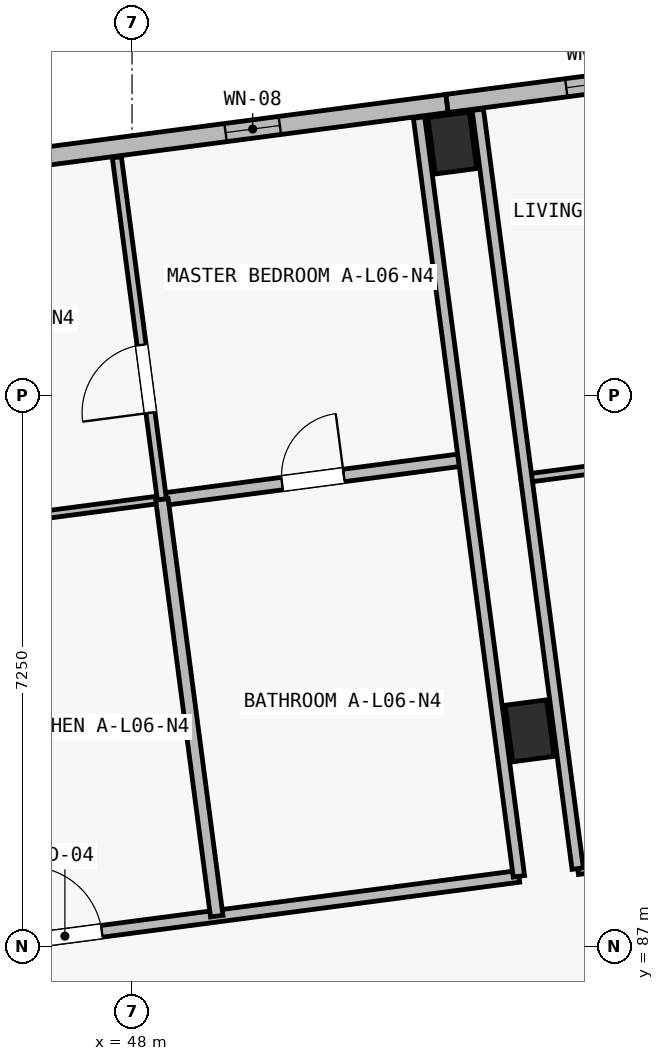
"""IFC4 building model, lengths in metres.
Left out: names, types, materials, properties, quantities, classifications, styles, units other than length and angle.
Written with IfcOpenShell. Run it as: python <this file> out.ifc"""

import sys

from ifc_helpers import new_model, si_unit, direction, frame, frame_2d, origin, origin_2d, place, context, subcontext, project, spatial, rectangle, extrude, element, fill, save


model = new_model("IFC4")
c1 = context("Model", 3, precision=1e-05, world=origin(), true_north=direction((0.0, 1.0)))
c2 = subcontext(c1, "Body", "Model", "MODEL_VIEW")
j1 = project(units=[si_unit("LENGTHUNIT", "METRE"), si_unit("PLANEANGLEUNIT", "RADIAN")], contexts=[c1])
p1 = place(None, origin())
s1 = spatial("IfcSite", under=j1, at=p1, CompositionType="ELEMENT")
p2 = place(p1, origin())
s2 = spatial("IfcBuilding", under=s1, at=p2, CompositionType="ELEMENT")
p3 = place(p2, frame((0.0, 0.0, 21.4)))
s3 = spatial("IfcBuildingStorey", under=s2, at=p3, CompositionType="ELEMENT", Elevation=21.4)
for number, where, z_axis, x_axis in (
    (1, (53.231, 89.839, 0.0), (0.0, 0.0, 1.0), (0.991, 0.131, 0.0)),
    (2, (52.213, 97.572, 0.0), (0.0, 0.0, 1.0), (0.991, 0.131, 0.0)),
):
    element("IfcColumn", number, at=place(p3, frame(where, z_axis=z_axis, x_axis=x_axis)), inside=s3, PredefinedType="COLUMN", context=c2, shape_type="SweptSolid", body=[
        extrude(rectangle(XDim=0.55, YDim=0.75, at=origin_2d()), origin(), (0.0, 0.0, 1.0), 3.25),
    ])
p4 = place(p3, frame((43.42, 96.944, 0.0), z_axis=(0.0, 0.0, 1.0), x_axis=(0.991443905089, 0.130533455715, 0.0)))
e3 = element("IfcWall", 3, at=p4, inside=s3, PredefinedType="SOLIDWALL", context=c2, shape_type="SweptSolid", body=[
    extrude(rectangle(XDim=8.8, YDim=0.24, at=frame_2d((4.4, 0.0))), origin(), (0.0, 0.0, 1.0), 3.0),
])
p5 = place(p4, frame((2.241, 0.0, 0.44)))
e4 = element("IfcOpeningElement", 4, at=p5, cuts=e3, PredefinedType="OPENING", context=c2, shape_type="SweptSolid", body=[
    extrude(rectangle(XDim=0.64, YDim=2.18, at=frame_2d((0.32, 1.09))), frame((0.0, 0.135, 0.0), z_axis=(0.0, -1.0, 0.0), x_axis=(1.0, 0.0, 0.0)), (0.0, 0.0, 1.0), 0.27),
])
p6 = place(p4, frame((5.861, 0.0, 0.5)))
e5 = element("IfcOpeningElement", 5, at=p6, cuts=e3, PredefinedType="OPENING", context=c2, shape_type="SweptSolid", body=[
    extrude(rectangle(XDim=0.72, YDim=2.16, at=frame_2d((0.36, 1.08))), frame((0.0, 0.135, 0.0), z_axis=(0.0, -1.0, 0.0), x_axis=(1.0, 0.0, 0.0)), (0.0, 0.0, 1.0), 0.27),
])
p7 = place(p3, frame((52.145, 98.093, 0.0), z_axis=(0.0, 0.0, 1.0), x_axis=(0.991442885224, 0.130541201693, 0.0)))
e6 = element("IfcWall", 6, at=p7, inside=s3, PredefinedType="SOLIDWALL", context=c2, shape_type="SweptSolid", body=[
    extrude(rectangle(XDim=9.325, YDim=0.24, at=frame_2d((4.663, 0.0))), origin(), (0.0, 0.0, 1.0), 3.0),
])
p8 = place(p7, frame((1.582, 0.0, 0.5)))
e7 = element("IfcOpeningElement", 7, at=p8, cuts=e6, PredefinedType="OPENING", context=c2, shape_type="SweptSolid", body=[
    extrude(rectangle(XDim=0.78, YDim=2.2, at=frame_2d((0.39, 1.1))), frame((0.0, 0.135, 0.0), z_axis=(0.0, -1.0, 0.0), x_axis=(1.0, 0.0, 0.0)), (0.0, 0.0, 1.0), 0.27),
])
p9 = place(p7, frame((6.926, 0.0, 0.44)))
e8 = element("IfcOpeningElement", 8, at=p9, cuts=e6, PredefinedType="OPENING", context=c2, shape_type="SweptSolid", body=[
    extrude(rectangle(XDim=0.86, YDim=2.36, at=frame_2d((0.43, 1.18))), frame((0.0, 0.135, 0.0), z_axis=(0.0, -1.0, 0.0), x_axis=(1.0, 0.0, 0.0)), (0.0, 0.0, 1.0), 0.27),
])
p10 = place(p3, frame((45.138, 86.877, 0.0), z_axis=(0.0, 0.0, 1.0), x_axis=(0.991444034844, 0.130532470184, 0.0)))
e9 = element("IfcWall", 9, at=p10, inside=s3, PredefinedType="PARTITIONING", context=c2, shape_type="SweptSolid", body=[
    extrude(rectangle(XDim=8.02, YDim=0.155, at=frame_2d((4.01, 0.0))), origin(), (0.0, 0.0, 1.0), 2.97),
])
p11 = place(p10, frame((1.505, 0.0, 0.0)))
e10 = element("IfcOpeningElement", 10, at=p11, cuts=e9, PredefinedType="OPENING", context=c2, shape_type="SweptSolid", body=[
    extrude(rectangle(XDim=0.98, YDim=2.15, at=frame_2d((0.49, 1.075))), frame((0.0, 0.093, 0.0), z_axis=(0.0, -1.0, 0.0), x_axis=(1.0, 0.0, 0.0)), (0.0, 0.0, 1.0), 0.185),
])
p12 = place(p3, frame((44.417, 92.36, 0.0), z_axis=(0.0, 0.0, 1.0), x_axis=(0.991443516139, 0.130536409887, 0.0)))
e11 = element("IfcWall", 11, at=p12, inside=s3, PredefinedType="PARTITIONING", context=c2, shape_type="SweptSolid", body=[
    extrude(rectangle(XDim=4.01, YDim=0.1, at=frame_2d((2.005, 0.0))), origin(), (0.0, 0.0, 1.0), 2.97),
])
p13 = place(p12, frame((1.555, 0.0, 0.0)))
e12 = element("IfcOpeningElement", 12, at=p13, cuts=e11, PredefinedType="OPENING", context=c2, shape_type="SweptSolid", body=[
    extrude(rectangle(XDim=0.88, YDim=2.1, at=frame_2d((0.44, 1.05))), frame((0.0, 0.065, 0.0), z_axis=(0.0, -1.0, 0.0), x_axis=(1.0, 0.0, 0.0)), (0.0, 0.0, 1.0), 0.13),
])
p14 = place(p3, frame((48.392, 92.883, 0.0), z_axis=(0.0, 0.0, 1.0), x_axis=(0.991444553502, 0.130528530716, 0.0)))
e13 = element("IfcWall", 13, at=p14, inside=s3, PredefinedType="PLUMBINGWALL", context=c2, shape_type="SweptSolid", body=[
    extrude(rectangle(XDim=4.01, YDim=0.165, at=frame_2d((2.005, 0.0))), origin(), (0.0, 0.0, 1.0), 2.97),
])
p15 = place(p14, frame((1.595, 0.0, 0.0)))
e14 = element("IfcOpeningElement", 14, at=p15, cuts=e13, PredefinedType="OPENING", context=c2, shape_type="SweptSolid", body=[
    extrude(rectangle(XDim=0.82, YDim=2.08, at=frame_2d((0.41, 1.04))), frame((0.0, 0.097, 0.0), z_axis=(0.0, -1.0, 0.0), x_axis=(1.0, 0.0, 0.0)), (0.0, 0.0, 1.0), 0.195),
])
p16 = place(p3, frame((48.392, 92.883, 0.0), z_axis=(0.0, 0.0, 1.0), x_axis=(-0.130518503748, 0.99144587355, 0.0)))
e15 = element("IfcWall", 15, at=p16, inside=s3, PredefinedType="PARTITIONING", context=c2, shape_type="SweptSolid", body=[
    extrude(rectangle(XDim=4.54, YDim=0.12, at=frame_2d((2.27, 0.0))), origin(), (0.0, 0.0, 1.0), 2.97),
])
p17 = place(p16, frame((1.15, 0.0, 0.0)))
e16 = element("IfcOpeningElement", 16, at=p17, cuts=e15, PredefinedType="OPENING", context=c2, shape_type="SweptSolid", body=[
    extrude(rectangle(XDim=0.9, YDim=2.1, at=frame_2d((0.45, 1.05))), frame((0.0, 0.075, 0.0), z_axis=(0.0, -1.0, 0.0), x_axis=(1.0, 0.0, 0.0)), (0.0, 0.0, 1.0), 0.15),
])
p18 = place(p3, frame((49.114, 87.401, 0.0), z_axis=(0.0, 0.0, 1.0), x_axis=(-0.130547016415, 0.991442119594, 0.0)))
e17 = element("IfcWall", 17, at=p18, inside=s3, PredefinedType="PLUMBINGWALL", context=c2, shape_type="SweptSolid", body=[
    extrude(rectangle(XDim=5.53, YDim=0.165, at=frame_2d((2.765, 0.0))), origin(), (0.0, 0.0, 1.0), 2.97),
])
p19 = place(p3, frame((53.09, 87.924, 0.0), z_axis=(0.0, 0.0, 1.0), x_axis=(-0.130534161944, 0.991443812107, 0.0)))
e18 = element("IfcWall", 18, at=p19, inside=s3, PredefinedType="PARTITIONING", context=c2, shape_type="SweptSolid", body=[
    extrude(rectangle(XDim=10.07, YDim=0.15, at=frame_2d((5.035, 0.0))), origin(), (0.0, 0.0, 1.0), 2.97),
])
p20 = place(p3, frame((53.863, 88.026, 0.0), z_axis=(0.0, 0.0, 1.0), x_axis=(0.991447973994, 0.130502547346, 0.0)))
e19 = element("IfcWall", 19, at=p20, inside=s3, PredefinedType="PARTITIONING", context=c2, shape_type="SweptSolid", body=[
    extrude(rectangle(XDim=8.02, YDim=0.155, at=frame_2d((4.01, 0.0))), origin(), (0.0, 0.0, 1.0), 2.97),
])
p21 = place(p20, frame((1.505, 0.0, 0.0)))
e20 = element("IfcOpeningElement", 20, at=p21, cuts=e19, PredefinedType="OPENING", context=c2, shape_type="SweptSolid", body=[
    extrude(rectangle(XDim=1.02, YDim=2.2, at=frame_2d((0.51, 1.1))), frame((0.0, 0.093, 0.0), z_axis=(0.0, -1.0, 0.0), x_axis=(1.0, 0.0, 0.0)), (0.0, 0.0, 1.0), 0.185),
])
p22 = place(p3, frame((53.187, 93.161, 0.0), z_axis=(0.0, 0.0, 1.0), x_axis=(0.991444553502, 0.130528530716, 0.0)))
e21 = element("IfcWall", 21, at=p22, inside=s3, PredefinedType="PARTITIONING", context=c2, shape_type="SweptSolid", body=[
    extrude(rectangle(XDim=4.01, YDim=0.11, at=frame_2d((2.005, 0.0))), origin(), (0.0, 0.0, 1.0), 2.97),
])
p23 = place(p22, frame((1.555, 0.0, 0.0)))
e22 = element("IfcOpeningElement", 22, at=p23, cuts=e21, PredefinedType="OPENING", context=c2, shape_type="SweptSolid", body=[
    extrude(rectangle(XDim=0.9, YDim=2.1, at=frame_2d((0.45, 1.05))), frame((0.0, 0.07, 0.0), z_axis=(0.0, -1.0, 0.0), x_axis=(1.0, 0.0, 0.0)), (0.0, 0.0, 1.0), 0.14),
])
p24 = place(p3, frame((53.863, 88.026, 0.0), z_axis=(0.0, 0.0, 1.0), x_axis=(-0.130534161944, 0.991443812107, 0.0)))
e23 = element("IfcWall", 23, at=p24, inside=s3, PredefinedType="PARTITIONING", context=c2, shape_type="SweptSolid", body=[
    extrude(rectangle(XDim=10.07, YDim=0.15, at=frame_2d((5.035, 0.0))), origin(), (0.0, 0.0, 1.0), 2.97),
])
p25 = place(p6, origin())
e24 = element("IfcWindow", 24, at=p25, inside=s3, PartitioningType="SINGLE_PANEL", PredefinedType="WINDOW", context=c2, shape_type="SweptSolid", body=[
    extrude(rectangle(XDim=0.72, YDim=2.16, at=frame_2d((0.36, 1.08))), frame((0.0, 0.03, 0.0), z_axis=(0.0, -1.0, 0.0), x_axis=(1.0, 0.0, 0.0)), (0.0, 0.0, 1.0), 0.06),
])
fill(e5, e24)
p26 = place(p8, origin())
e25 = element("IfcWindow", 25, at=p26, inside=s3, PartitioningType="SINGLE_PANEL", PredefinedType="WINDOW", context=c2, shape_type="SweptSolid", body=[
    extrude(rectangle(XDim=0.78, YDim=2.2, at=frame_2d((0.39, 1.1))), frame((0.0, 0.03, 0.0), z_axis=(0.0, -1.0, 0.0), x_axis=(1.0, 0.0, 0.0)), (0.0, 0.0, 1.0), 0.06),
])
fill(e7, e25)
p27 = place(p11, origin())
e26 = element("IfcDoor", 26, at=p27, inside=s3, OperationType="SINGLE_SWING_LEFT", PredefinedType="DOOR", context=c2, shape_type="SweptSolid", body=[
    extrude(rectangle(XDim=0.98, YDim=2.15, at=frame_2d((0.49, 1.075))), frame((0.0, 0.025, 0.0), z_axis=(0.0, -1.0, 0.0), x_axis=(1.0, 0.0, 0.0)), (0.0, 0.0, 1.0), 0.05),
])
fill(e10, e26)
p28 = place(p15, origin())
e27 = element("IfcDoor", 27, at=p28, inside=s3, OperationType="SINGLE_SWING_RIGHT", PredefinedType="DOOR", context=c2, shape_type="SweptSolid", body=[
    extrude(rectangle(XDim=0.82, YDim=2.08, at=frame_2d((0.41, 1.04))), frame((0.0, 0.025, 0.0), z_axis=(0.0, -1.0, 0.0), x_axis=(1.0, 0.0, 0.0)), (0.0, 0.0, 1.0), 0.05),
])
fill(e14, e27)
p29 = place(p17, origin())
e28 = element("IfcDoor", 28, at=p29, inside=s3, OperationType="SINGLE_SWING_LEFT", PredefinedType="DOOR", context=c2, shape_type="SweptSolid", body=[
    extrude(rectangle(XDim=0.9, YDim=2.1, at=frame_2d((0.45, 1.05))), frame((0.0, 0.025, 0.0), z_axis=(0.0, -1.0, 0.0), x_axis=(1.0, 0.0, 0.0)), (0.0, 0.0, 1.0), 0.05),
])
fill(e16, e28)
save(model, sys.argv[1])
